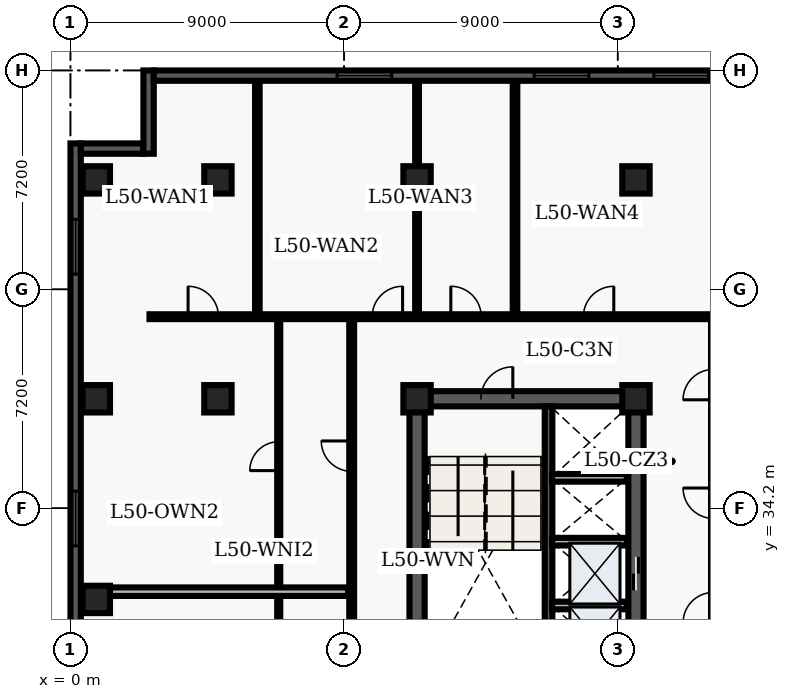
"""IFC4 building model, lengths in metres.
Left out: names, types, materials, properties, quantities, classifications, styles, units other than length and angle.
Written with IfcOpenShell. Run it as: python <this file> out.ifc"""

import sys

from ifc_helpers import new_model, entity, si_unit, converted_unit, direction, frame, origin_with_axes, origin_2d_with_axis, place, context, subcontext, project, spatial, polyline, rectangle, outline, extrude, element, fill, save


model = new_model("IFC4")
c1 = context("Model", 3, precision=1e-05, world=origin_with_axes(), true_north=direction((0.0, 1.0)))
c2 = subcontext(c1, "Body", "Model", "MODEL_VIEW")
j1 = project(units=[si_unit("LENGTHUNIT", "METRE"), converted_unit("PLANEANGLEUNIT", "DEGREE", entity("IfcPlaneAngleMeasure", 0.017), si_unit("PLANEANGLEUNIT", "RADIAN"), dimensions=[0, 0, 0, 0, 0, 0, 0])], contexts=[c1])
p1 = place(None, origin_with_axes())
s1 = spatial("IfcSite", under=j1, at=p1, CompositionType="ELEMENT")
p2 = place(p1, origin_with_axes())
s2 = spatial("IfcBuilding", under=s1, at=p2, CompositionType="ELEMENT")
p3 = place(p2, frame((0.0, 0.0, 204.3), z_axis=(0.0, 0.0, 1.0), x_axis=(1.0, 0.0, 0.0)))
s3 = spatial("IfcBuildingStorey", under=s2, at=p3, CompositionType="ELEMENT", Elevation=204.3)
p4 = place(p3, frame((11.4, 10.8, 0.0), z_axis=(0.0, 0.0, 1.0), x_axis=(0.0, 1.0, 0.0)))
e1 = element("IfcWall", 1, at=p4, inside=s3, PredefinedType="SHEAR", context=c2, shape_type="SweptSolid", body=[
    extrude(outline(polyline([(0.0, -0.25), (27.0, -0.25), (27.0, 0.25), (0.0, 0.25), (0.0, -0.25)])), origin_with_axes(), (0.0, 0.0, 1.0), 3.66),
])
p5 = place(p3, frame((11.4, 37.8, 0.0), z_axis=(0.0, 0.0, 1.0), x_axis=(1.0, 0.0, 0.0)))
e2 = element("IfcWall", 2, at=p5, inside=s3, PredefinedType="SHEAR", context=c2, shape_type="SweptSolid", body=[
    extrude(outline(polyline([(0.0, -0.25), (7.2, -0.25), (7.2, 0.25), (0.0, 0.25), (0.0, -0.25)])), origin_with_axes(), (0.0, 0.0, 1.0), 3.66),
])
p6 = place(p5, frame((2.625, 0.0, 0.0), z_axis=(0.0, 0.0, 1.0), x_axis=(1.0, 0.0, 0.0)))
e3 = element("IfcOpeningElement", 3, at=p6, cuts=e2, PredefinedType="OPENING", context=c2, shape_type="SweptSolid", body=[
    extrude(rectangle(XDim=1.05, YDim=0.52, at=origin_2d_with_axis()), origin_with_axes(), (0.0, 0.0, 1.0), 2.15),
])
p7 = place(p3, frame((18.6, 24.3, 0.0), z_axis=(0.0, 0.0, 1.0), x_axis=(0.0, 1.0, 0.0)))
e4 = element("IfcWall", 4, at=p7, inside=s3, PredefinedType="SHEAR", context=c2, shape_type="SweptSolid", body=[
    extrude(outline(polyline([(0.0, -0.25), (13.5, -0.25), (13.5, 0.25), (0.0, 0.25), (0.0, -0.25)])), origin_with_axes(), (0.0, 0.0, 1.0), 3.66),
])
p8 = place(p7, frame((5.65, 0.0, 0.0), z_axis=(0.0, 0.0, 1.0), x_axis=(1.0, 0.0, 0.0)))
e5 = element("IfcOpeningElement", 5, at=p8, cuts=e4, PredefinedType="OPENING", context=c2, shape_type="SweptSolid", body=[
    extrude(rectangle(XDim=1.1, YDim=0.52, at=origin_2d_with_axis()), origin_with_axes(), (0.0, 0.0, 1.0), 2.15),
])
p9 = place(p7, frame((7.75, 0.0, 0.0), z_axis=(0.0, 0.0, 1.0), x_axis=(1.0, 0.0, 0.0)))
e6 = element("IfcOpeningElement", 6, at=p9, cuts=e4, PredefinedType="OPENING", context=c2, shape_type="SweptSolid", body=[
    extrude(rectangle(XDim=1.1, YDim=0.52, at=origin_2d_with_axis()), origin_with_axes(), (0.0, 0.0, 1.0), 2.15),
])
p10 = place(p3, frame((15.725, 28.9, 0.0), z_axis=(0.0, 0.0, 1.0), x_axis=(0.0, 1.0, 0.0)))
e7 = element("IfcWall", 7, at=p10, inside=s3, PredefinedType="SHEAR", context=c2, shape_type="SweptSolid", body=[
    extrude(outline(polyline([(0.0, -0.125), (8.65, -0.125), (8.65, 0.125), (0.0, 0.125), (0.0, -0.125)])), origin_with_axes(), (0.0, 0.0, 1.0), 3.66),
])
for number, where, z_axis, x_axis in (
    (8, (11.4, 37.8, 0.0), (0.0, 0.0, 1.0), (1.0, 0.0, 0.0)),
    (9, (11.4, 45.0, 0.0), (0.0, 0.0, 1.0), (1.0, 0.0, 0.0)),
    (10, (18.6, 37.8, 0.0), (0.0, 0.0, 1.0), (1.0, 0.0, 0.0)),
    (11, (18.6, 45.0, 0.0), (0.0, 0.0, 1.0), (1.0, 0.0, 0.0)),
    (12, (4.85, 37.8, 0.0), (0.0, 0.0, 1.0), (1.0, 0.0, 0.0)),
    (13, (4.85, 45.0, 0.0), (0.0, 0.0, 1.0), (1.0, 0.0, 0.0)),
    (14, (0.85, 31.2, 0.0), (0.0, 0.0, 1.0), (1.0, 0.0, 0.0)),
    (15, (0.85, 37.8, 0.0), (0.0, 0.0, 1.0), (1.0, 0.0, 0.0)),
    (16, (0.85, 45.0, 0.0), (0.0, 0.0, 1.0), (1.0, 0.0, 0.0)),
):
    element("IfcColumn", number, at=place(p3, frame(where, z_axis=z_axis, x_axis=x_axis)), inside=s3, PredefinedType="COLUMN", context=c2, shape_type="SweptSolid", body=[
        extrude(rectangle(XDim=0.9, YDim=0.9, at=origin_2d_with_axis()), origin_with_axes(), (0.0, 0.0, 1.0), 3.9),
    ])
for number, where, z_axis, x_axis in (
    (17, (15.84, 31.0, 0.0), (0.0, 0.0, 1.0), (1.0, 0.0, 0.0)),
    (18, (15.84, 33.1, 0.0), (0.0, 0.0, 1.0), (1.0, 0.0, 0.0)),
    (19, (15.84, 35.2, 0.0), (0.0, 0.0, 1.0), (1.0, 0.0, 0.0)),
):
    element("IfcWall", number, at=place(p3, frame(where, z_axis=z_axis, x_axis=x_axis)), inside=s3, PredefinedType="SOLIDWALL", context=c2, shape_type="SweptSolid", body=[
        extrude(outline(polyline([(0.0, -0.125), (2.46, -0.125), (2.46, 0.125), (0.0, 0.125), (0.0, -0.125)])), origin_with_axes(), (0.0, 0.0, 1.0), 2.7),
    ])
p11 = place(p3, frame((2.6, 40.5, 0.0), z_axis=(0.0, 0.0, 1.0), x_axis=(1.0, 0.0, 0.0)))
e20 = element("IfcWall", 20, at=p11, inside=s3, PredefinedType="PARTITIONING", context=c2, shape_type="SweptSolid", body=[
    extrude(outline(polyline([(0.0, -0.08), (26.946, -0.08), (26.946, 0.08), (0.0, 0.08), (0.0, -0.08)])), origin_with_axes(), (0.0, 0.0, 1.0), 2.7),
])
p12 = place(p11, frame((1.768, 0.0, 0.0), z_axis=(0.0, 0.0, 1.0), x_axis=(1.0, 0.0, 0.0)))
e21 = element("IfcOpeningElement", 21, at=p12, cuts=e20, PredefinedType="OPENING", context=c2, shape_type="SweptSolid", body=[
    extrude(rectangle(XDim=1.0, YDim=0.18, at=origin_2d_with_axis()), origin_with_axes(), (0.0, 0.0, 1.0), 2.15),
])
p13 = place(p11, frame((7.824, 0.0, 0.0), z_axis=(0.0, 0.0, 1.0), x_axis=(1.0, 0.0, 0.0)))
e22 = element("IfcOpeningElement", 22, at=p13, cuts=e20, PredefinedType="OPENING", context=c2, shape_type="SweptSolid", body=[
    extrude(rectangle(XDim=1.0, YDim=0.18, at=origin_2d_with_axis()), origin_with_axes(), (0.0, 0.0, 1.0), 2.15),
])
p14 = place(p11, frame((10.411, 0.0, 0.0), z_axis=(0.0, 0.0, 1.0), x_axis=(1.0, 0.0, 0.0)))
e23 = element("IfcOpeningElement", 23, at=p14, cuts=e20, PredefinedType="OPENING", context=c2, shape_type="SweptSolid", body=[
    extrude(rectangle(XDim=1.0, YDim=0.18, at=origin_2d_with_axis()), origin_with_axes(), (0.0, 0.0, 1.0), 2.15),
])
p15 = place(p11, frame((14.771, 0.0, 0.0), z_axis=(0.0, 0.0, 1.0), x_axis=(1.0, 0.0, 0.0)))
e24 = element("IfcOpeningElement", 24, at=p15, cuts=e20, PredefinedType="OPENING", context=c2, shape_type="SweptSolid", body=[
    extrude(rectangle(XDim=1.0, YDim=0.18, at=origin_2d_with_axis()), origin_with_axes(), (0.0, 0.0, 1.0), 2.15),
])
p16 = place(p3, frame((9.25, 24.4, 0.0), z_axis=(0.0, 0.0, 1.0), x_axis=(0.0, 1.0, 0.0)))
e25 = element("IfcWall", 25, at=p16, inside=s3, PredefinedType="PARTITIONING", context=c2, shape_type="SweptSolid", body=[
    extrude(outline(polyline([(0.0, -0.08), (16.1, -0.08), (16.1, 0.08), (0.0, 0.08), (0.0, -0.08)])), origin_with_axes(), (0.0, 0.0, 1.0), 2.7),
])
p17 = place(p16, frame((3.567, 0.0, 0.0), z_axis=(0.0, 0.0, 1.0), x_axis=(1.0, 0.0, 0.0)))
e26 = element("IfcOpeningElement", 26, at=p17, cuts=e25, PredefinedType="OPENING", context=c2, shape_type="SweptSolid", body=[
    extrude(rectangle(XDim=1.0, YDim=0.18, at=origin_2d_with_axis()), origin_with_axes(), (0.0, 0.0, 1.0), 2.15),
])
p18 = place(p16, frame((11.512, 0.0, 0.0), z_axis=(0.0, 0.0, 1.0), x_axis=(1.0, 0.0, 0.0)))
e27 = element("IfcOpeningElement", 27, at=p18, cuts=e25, PredefinedType="OPENING", context=c2, shape_type="SweptSolid", body=[
    extrude(rectangle(XDim=1.0, YDim=0.18, at=origin_2d_with_axis()), origin_with_axes(), (0.0, 0.0, 1.0), 2.15),
])
p19 = place(p3, frame((6.85, 24.55, 0.0), z_axis=(0.0, 0.0, 1.0), x_axis=(0.0, 1.0, 0.0)))
e28 = element("IfcWall", 28, at=p19, inside=s3, PredefinedType="PARTITIONING", context=c2, shape_type="SweptSolid", body=[
    extrude(outline(polyline([(0.0, -0.05), (15.75, -0.05), (15.75, 0.05), (0.0, 0.05), (0.0, -0.05)])), origin_with_axes(), (0.0, 0.0, 1.0), 2.7),
])
p20 = place(p19, frame((3.417, 0.0, 0.0), z_axis=(0.0, 0.0, 1.0), x_axis=(1.0, 0.0, 0.0)))
e29 = element("IfcOpeningElement", 29, at=p20, cuts=e28, PredefinedType="OPENING", context=c2, shape_type="SweptSolid", body=[
    extrude(rectangle(XDim=0.95, YDim=0.12, at=origin_2d_with_axis()), origin_with_axes(), (0.0, 0.0, 1.0), 2.15),
])
p21 = place(p19, frame((11.363, 0.0, 0.0), z_axis=(0.0, 0.0, 1.0), x_axis=(1.0, 0.0, 0.0)))
e30 = element("IfcOpeningElement", 30, at=p21, cuts=e28, PredefinedType="OPENING", context=c2, shape_type="SweptSolid", body=[
    extrude(rectangle(XDim=0.95, YDim=0.12, at=origin_2d_with_axis()), origin_with_axes(), (0.0, 0.0, 1.0), 2.15),
])
p22 = place(p3, frame((0.335, 31.455, 0.0), z_axis=(0.0, 0.0, 1.0), x_axis=(1.0, 0.0, 0.0)))
e31 = element("IfcWall", 31, at=p22, inside=s3, PredefinedType="PARTITIONING", context=c2, shape_type="SweptSolid", body=[
    extrude(outline(polyline([(0.0, -0.14), (8.795, -0.14), (8.795, 0.14), (0.0, 0.14), (0.0, -0.14)])), origin_with_axes(), (0.0, 0.0, 1.0), 2.7),
])
p23 = place(p3, frame((6.147, 40.6, 0.0), z_axis=(0.0, 0.0, 1.0), x_axis=(0.0, 1.0, 0.0)))
e32 = element("IfcWall", 32, at=p23, inside=s3, PredefinedType="PARTITIONING", context=c2, shape_type="SweptSolid", body=[
    extrude(outline(polyline([(0.0, -0.075), (7.665, -0.075), (7.665, 0.075), (0.0, 0.075), (0.0, -0.075)])), origin_with_axes(), (0.0, 0.0, 1.0), 2.7),
])
p24 = place(p3, frame((11.4, 40.6, 0.0), z_axis=(0.0, 0.0, 1.0), x_axis=(0.0, 1.0, 0.0)))
e33 = element("IfcWall", 33, at=p24, inside=s3, PredefinedType="PARTITIONING", context=c2, shape_type="SweptSolid", body=[
    extrude(outline(polyline([(0.0, -0.062), (7.665, -0.062), (7.665, 0.062), (0.0, 0.062), (0.0, -0.062)])), origin_with_axes(), (0.0, 0.0, 1.0), 2.7),
])
p25 = place(p3, frame((14.622, 40.6, 0.0), z_axis=(0.0, 0.0, 1.0), x_axis=(0.0, 1.0, 0.0)))
e34 = element("IfcWall", 34, at=p25, inside=s3, PredefinedType="PARTITIONING", context=c2, shape_type="SweptSolid", body=[
    extrude(outline(polyline([(0.0, -0.075), (7.665, -0.075), (7.665, 0.075), (0.0, 0.075), (0.0, -0.075)])), origin_with_axes(), (0.0, 0.0, 1.0), 2.7),
])
p26 = place(p3, frame((0.17, 2.74, 0.0), z_axis=(0.0, 0.0, 1.0), x_axis=(0.0, 1.0, 0.0)))
e35 = element("IfcWall", 35, at=p26, inside=s3, PredefinedType="SOLIDWALL", context=c2, shape_type="SweptSolid", body=[
    extrude(outline(polyline([(0.0, -0.17), (43.46, -0.17), (43.46, 0.17), (0.0, 0.17), (0.0, -0.17)])), origin_with_axes(), (0.0, 0.0, 1.0), 3.66),
])
p27 = place(p26, frame((2.948, 0.0, 0.45), z_axis=(0.0, 0.0, 1.0), x_axis=(1.0, 0.0, 0.0)))
e36 = element("IfcOpeningElement", 36, at=p27, cuts=e35, PredefinedType="OPENING", context=c2, shape_type="SweptSolid", body=[
    extrude(rectangle(XDim=1.8, YDim=0.36, at=origin_2d_with_axis()), origin_with_axes(), (0.0, 0.0, 1.0), 2.1),
])
p28 = place(p26, frame((12.339, 0.0, 0.45), z_axis=(0.0, 0.0, 1.0), x_axis=(1.0, 0.0, 0.0)))
e37 = element("IfcOpeningElement", 37, at=p28, cuts=e35, PredefinedType="OPENING", context=c2, shape_type="SweptSolid", body=[
    extrude(rectangle(XDim=1.8, YDim=0.36, at=origin_2d_with_axis()), origin_with_axes(), (0.0, 0.0, 1.0), 2.1),
])
p29 = place(p26, frame((26.426, 0.0, 0.45), z_axis=(0.0, 0.0, 1.0), x_axis=(1.0, 0.0, 0.0)))
e38 = element("IfcOpeningElement", 38, at=p29, cuts=e35, PredefinedType="OPENING", context=c2, shape_type="SweptSolid", body=[
    extrude(rectangle(XDim=1.8, YDim=0.36, at=origin_2d_with_axis()), origin_with_axes(), (0.0, 0.0, 1.0), 2.1),
])
p30 = place(p26, frame((31.121, 0.0, 0.45), z_axis=(0.0, 0.0, 1.0), x_axis=(1.0, 0.0, 0.0)))
e39 = element("IfcOpeningElement", 39, at=p30, cuts=e35, PredefinedType="OPENING", context=c2, shape_type="SweptSolid", body=[
    extrude(rectangle(XDim=1.8, YDim=0.36, at=origin_2d_with_axis()), origin_with_axes(), (0.0, 0.0, 1.0), 2.1),
])
p31 = place(p26, frame((40.062, 0.0, 0.45), z_axis=(0.0, 0.0, 1.0), x_axis=(1.0, 0.0, 0.0)))
e40 = element("IfcOpeningElement", 40, at=p31, cuts=e35, PredefinedType="OPENING", context=c2, shape_type="SweptSolid", body=[
    extrude(rectangle(XDim=1.8, YDim=0.36, at=origin_2d_with_axis()), origin_with_axes(), (0.0, 0.0, 1.0), 2.1),
])
p32 = place(p3, frame((0.34, 46.03, 0.0), z_axis=(0.0, 0.0, 1.0), x_axis=(1.0, 0.0, 0.0)))
e41 = element("IfcWall", 41, at=p32, inside=s3, PredefinedType="SOLIDWALL", context=c2, shape_type="SweptSolid", body=[
    extrude(outline(polyline([(0.0, -0.17), (2.06, -0.17), (2.06, 0.17), (0.0, 0.17), (0.0, -0.17)])), origin_with_axes(), (0.0, 0.0, 1.0), 3.66),
])
p33 = place(p3, frame((2.57, 45.86, 0.0), z_axis=(0.0, 0.0, 1.0), x_axis=(0.0, 1.0, 0.0)))
e42 = element("IfcWall", 42, at=p33, inside=s3, PredefinedType="SOLIDWALL", context=c2, shape_type="SweptSolid", body=[
    extrude(outline(polyline([(0.0, -0.17), (2.74, -0.17), (2.74, 0.17), (0.0, 0.17), (0.0, -0.17)])), origin_with_axes(), (0.0, 0.0, 1.0), 3.66),
])
p34 = place(p3, frame((2.74, 48.43, 0.0), z_axis=(0.0, 0.0, 1.0), x_axis=(1.0, 0.0, 0.0)))
e43 = element("IfcWall", 43, at=p34, inside=s3, PredefinedType="SOLIDWALL", context=c2, shape_type="SweptSolid", body=[
    extrude(outline(polyline([(0.0, -0.17), (20.341, -0.17), (20.341, 0.17), (0.0, 0.17), (0.0, -0.17)])), origin_with_axes(), (0.0, 0.0, 1.0), 3.66),
])
p35 = place(p34, frame((6.928, 0.0, 0.45), z_axis=(0.0, 0.0, 1.0), x_axis=(1.0, 0.0, 0.0)))
e44 = element("IfcOpeningElement", 44, at=p35, cuts=e43, PredefinedType="OPENING", context=c2, shape_type="SweptSolid", body=[
    extrude(rectangle(XDim=1.8, YDim=0.36, at=origin_2d_with_axis()), origin_with_axes(), (0.0, 0.0, 1.0), 2.1),
])
p36 = place(p34, frame((13.413, 0.0, 0.45), z_axis=(0.0, 0.0, 1.0), x_axis=(1.0, 0.0, 0.0)))
e45 = element("IfcOpeningElement", 45, at=p36, cuts=e43, PredefinedType="OPENING", context=c2, shape_type="SweptSolid", body=[
    extrude(rectangle(XDim=1.8, YDim=0.36, at=origin_2d_with_axis()), origin_with_axes(), (0.0, 0.0, 1.0), 2.1),
])
p37 = place(p34, frame((17.348, 0.0, 0.45), z_axis=(0.0, 0.0, 1.0), x_axis=(1.0, 0.0, 0.0)))
e46 = element("IfcOpeningElement", 46, at=p37, cuts=e43, PredefinedType="OPENING", context=c2, shape_type="SweptSolid", body=[
    extrude(rectangle(XDim=1.8, YDim=0.36, at=origin_2d_with_axis()), origin_with_axes(), (0.0, 0.0, 1.0), 2.1),
])
p38 = place(p7, frame((7.75, 0.0, 0.0), z_axis=(0.0, 0.0, 1.0), x_axis=(1.0, 0.0, 0.0)))
e47 = element("IfcDoor", 47, at=p38, inside=s3, OperationType="SLIDING_TO_RIGHT", PredefinedType="DOOR", context=c2, shape_type="SweptSolid", body=[
    extrude(rectangle(XDim=1.1, YDim=0.09, at=origin_2d_with_axis()), origin_with_axes(), (0.0, 0.0, 1.0), 2.15),
])
fill(e6, e47)
p39 = place(p5, frame((2.625, 0.0, 0.0), z_axis=(0.0, 0.0, 1.0), x_axis=(1.0, 0.0, 0.0)))
e48 = element("IfcDoor", 48, at=p39, inside=s3, OperationType="SINGLE_SWING_RIGHT", PredefinedType="DOOR", context=c2, shape_type="SweptSolid", body=[
    extrude(rectangle(XDim=1.05, YDim=0.09, at=origin_2d_with_axis()), origin_with_axes(), (0.0, 0.0, 1.0), 2.15),
])
fill(e3, e48)
p40 = place(p19, frame((11.363, 0.0, 0.0), z_axis=(0.0, 0.0, 1.0), x_axis=(1.0, 0.0, 0.0)))
e49 = element("IfcDoor", 49, at=p40, inside=s3, OperationType="SINGLE_SWING_LEFT", PredefinedType="DOOR", context=c2, shape_type="SweptSolid", body=[
    extrude(rectangle(XDim=0.95, YDim=0.06, at=origin_2d_with_axis()), origin_with_axes(), (0.0, 0.0, 1.0), 2.15),
])
fill(e30, e49)
p41 = place(p16, frame((11.512, 0.0, 0.0), z_axis=(0.0, 0.0, 1.0), x_axis=(1.0, 0.0, 0.0)))
e50 = element("IfcDoor", 50, at=p41, inside=s3, OperationType="SINGLE_SWING_RIGHT", PredefinedType="DOOR", context=c2, shape_type="SweptSolid", body=[
    extrude(rectangle(XDim=1.0, YDim=0.09, at=origin_2d_with_axis()), origin_with_axes(), (0.0, 0.0, 1.0), 2.15),
])
fill(e27, e50)
p42 = place(p11, frame((1.768, 0.0, 0.0), z_axis=(0.0, 0.0, 1.0), x_axis=(1.0, 0.0, 0.0)))
e51 = element("IfcDoor", 51, at=p42, inside=s3, OperationType="SINGLE_SWING_LEFT", PredefinedType="DOOR", context=c2, shape_type="SweptSolid", body=[
    extrude(rectangle(XDim=1.0, YDim=0.09, at=origin_2d_with_axis()), origin_with_axes(), (0.0, 0.0, 1.0), 2.15),
])
fill(e21, e51)
p43 = place(p11, frame((7.824, 0.0, 0.0), z_axis=(0.0, 0.0, 1.0), x_axis=(1.0, 0.0, 0.0)))
e52 = element("IfcDoor", 52, at=p43, inside=s3, OperationType="SINGLE_SWING_RIGHT", PredefinedType="DOOR", context=c2, shape_type="SweptSolid", body=[
    extrude(rectangle(XDim=1.0, YDim=0.09, at=origin_2d_with_axis()), origin_with_axes(), (0.0, 0.0, 1.0), 2.15),
])
fill(e22, e52)
p44 = place(p11, frame((10.411, 0.0, 0.0), z_axis=(0.0, 0.0, 1.0), x_axis=(1.0, 0.0, 0.0)))
e53 = element("IfcDoor", 53, at=p44, inside=s3, OperationType="SINGLE_SWING_LEFT", PredefinedType="DOOR", context=c2, shape_type="SweptSolid", body=[
    extrude(rectangle(XDim=1.0, YDim=0.09, at=origin_2d_with_axis()), origin_with_axes(), (0.0, 0.0, 1.0), 2.15),
])
fill(e23, e53)
p45 = place(p11, frame((14.771, 0.0, 0.0), z_axis=(0.0, 0.0, 1.0), x_axis=(1.0, 0.0, 0.0)))
e54 = element("IfcDoor", 54, at=p45, inside=s3, OperationType="SINGLE_SWING_RIGHT", PredefinedType="DOOR", context=c2, shape_type="SweptSolid", body=[
    extrude(rectangle(XDim=1.0, YDim=0.09, at=origin_2d_with_axis()), origin_with_axes(), (0.0, 0.0, 1.0), 2.15),
])
fill(e24, e54)
p46 = place(p26, frame((31.121, 0.0, 0.45), z_axis=(0.0, 0.0, 1.0), x_axis=(1.0, 0.0, 0.0)))
e55 = element("IfcWindow", 55, at=p46, inside=s3, PredefinedType="WINDOW", context=c2, shape_type="SweptSolid", body=[
    extrude(rectangle(XDim=1.8, YDim=0.09, at=origin_2d_with_axis()), origin_with_axes(), (0.0, 0.0, 1.0), 2.1),
])
fill(e39, e55)
p47 = place(p26, frame((40.062, 0.0, 0.45), z_axis=(0.0, 0.0, 1.0), x_axis=(1.0, 0.0, 0.0)))
e56 = element("IfcWindow", 56, at=p47, inside=s3, PredefinedType="WINDOW", context=c2, shape_type="SweptSolid", body=[
    extrude(rectangle(XDim=1.8, YDim=0.09, at=origin_2d_with_axis()), origin_with_axes(), (0.0, 0.0, 1.0), 2.1),
])
fill(e40, e56)
p48 = place(p34, frame((6.928, 0.0, 0.45), z_axis=(0.0, 0.0, 1.0), x_axis=(1.0, 0.0, 0.0)))
e57 = element("IfcWindow", 57, at=p48, inside=s3, PredefinedType="WINDOW", context=c2, shape_type="SweptSolid", body=[
    extrude(rectangle(XDim=1.8, YDim=0.09, at=origin_2d_with_axis()), origin_with_axes(), (0.0, 0.0, 1.0), 2.1),
])
fill(e44, e57)
p49 = place(p34, frame((13.413, 0.0, 0.45), z_axis=(0.0, 0.0, 1.0), x_axis=(1.0, 0.0, 0.0)))
e58 = element("IfcWindow", 58, at=p49, inside=s3, PredefinedType="WINDOW", context=c2, shape_type="SweptSolid", body=[
    extrude(rectangle(XDim=1.8, YDim=0.09, at=origin_2d_with_axis()), origin_with_axes(), (0.0, 0.0, 1.0), 2.1),
])
fill(e45, e58)
p50 = place(p34, frame((17.348, 0.0, 0.45), z_axis=(0.0, 0.0, 1.0), x_axis=(1.0, 0.0, 0.0)))
e59 = element("IfcWindow", 59, at=p50, inside=s3, PredefinedType="WINDOW", context=c2, shape_type="SweptSolid", body=[
    extrude(rectangle(XDim=1.8, YDim=0.09, at=origin_2d_with_axis()), origin_with_axes(), (0.0, 0.0, 1.0), 2.1),
])
fill(e46, e59)
save(model, sys.argv[1])
